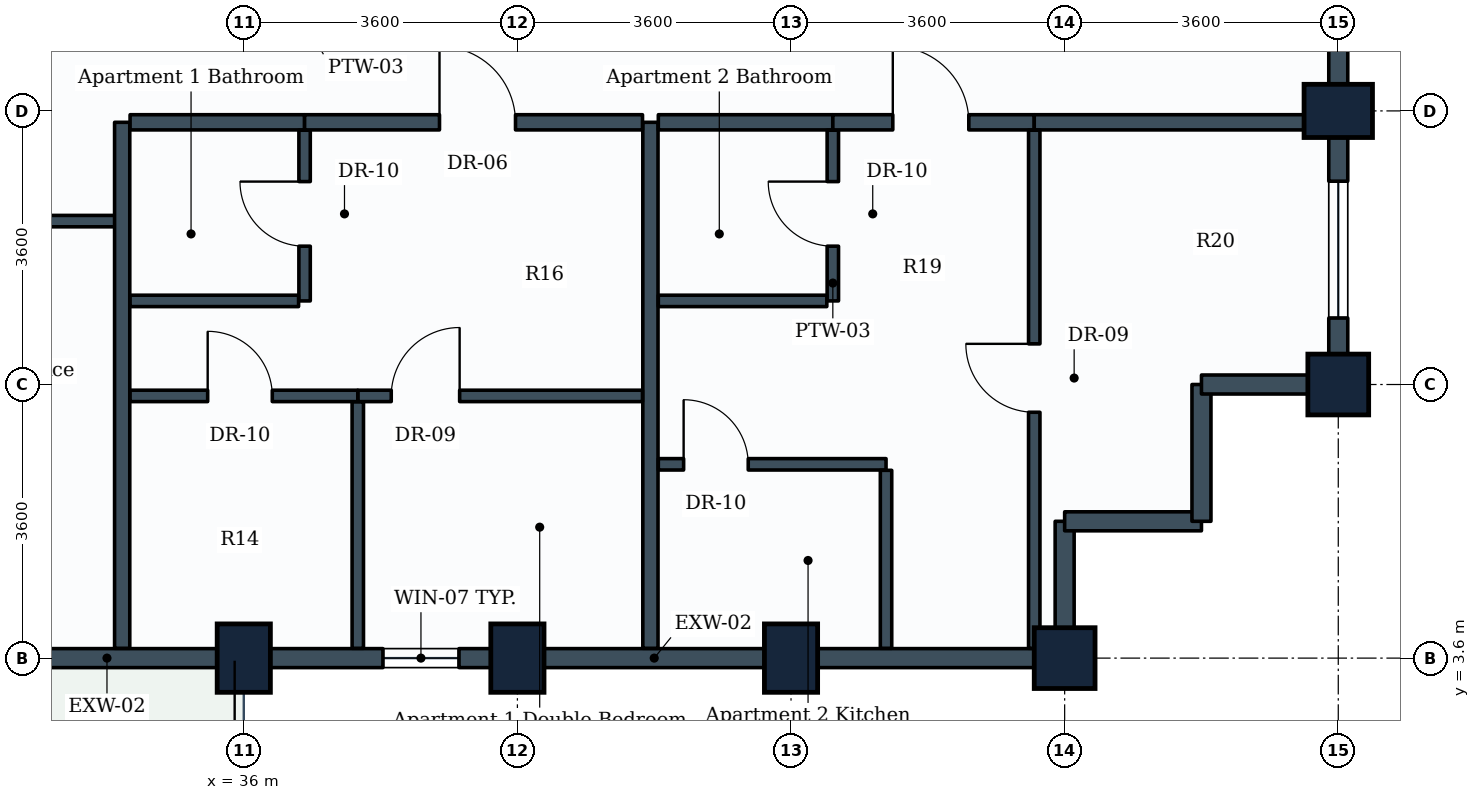
"""IFC4 building model, lengths in metres.
Left out: names, types, materials, properties, quantities, classifications, styles, units other than length and angle.
Written with IfcOpenShell. Run it as: python <this file> out.ifc"""

import sys

from ifc_helpers import new_model, si_unit, direction, frame, frame_2d, origin, origin_2d, place, context, subcontext, project, spatial, rectangle, extrude, element, fill, save


model = new_model("IFC4")
c1 = context("Model", 3, precision=1e-05, world=origin(), true_north=direction((0.0, 1.0)))
c2 = subcontext(c1, "Body", "Model", "MODEL_VIEW")
j1 = project(units=[si_unit("LENGTHUNIT", "METRE"), si_unit("PLANEANGLEUNIT", "RADIAN")], contexts=[c1])
p1 = place(None, origin())
s1 = spatial("IfcSite", under=j1, at=p1, CompositionType="ELEMENT")
p2 = place(p1, origin())
s2 = spatial("IfcBuilding", under=s1, at=p2, CompositionType="ELEMENT")
p3 = place(p2, frame((0.0, 0.0, 182.4)))
s3 = spatial("IfcBuildingStorey", under=s2, at=p3, CompositionType="ELEMENT", Elevation=182.4)
for number, where, z_axis, x_axis in (
    (1, (36.0, 3.6, 0.0), (0.0, 0.0, 1.0), (1.0, 0.0, 0.0)),
    (2, (39.6, 3.6, 0.0), (0.0, 0.0, 1.0), (1.0, 0.0, 0.0)),
    (3, (43.2, 3.6, 0.0), (0.0, 0.0, 1.0), (1.0, 0.0, 0.0)),
):
    element("IfcColumn", number, at=place(p3, frame(where, z_axis=z_axis, x_axis=x_axis)), inside=s3, PredefinedType="COLUMN", context=c2, shape_type="SweptSolid", body=[
        extrude(rectangle(XDim=0.7, YDim=0.9, at=origin_2d()), origin(), (0.0, 0.0, 1.0), 3.8),
    ])
for number, where, z_axis, x_axis in (
    (4, (46.8, 3.6, 0.0), (0.0, 0.0, 1.0), (1.0, 0.0, 0.0)),
    (5, (50.4, 7.2, 0.0), (0.0, 0.0, 1.0), (1.0, 0.0, 0.0)),
):
    element("IfcColumn", number, at=place(p3, frame(where, z_axis=z_axis, x_axis=x_axis)), inside=s3, PredefinedType="COLUMN", context=c2, shape_type="SweptSolid", body=[
        extrude(rectangle(XDim=0.8, YDim=0.8, at=origin_2d()), origin(), (0.0, 0.0, 1.0), 3.8),
    ])
p4 = place(p3, frame((50.4, 10.8, 0.0), z_axis=(0.0, 0.0, 1.0), x_axis=(0.0, 1.0, 0.0)))
e6 = element("IfcColumn", 6, at=p4, inside=s3, PredefinedType="COLUMN", context=c2, shape_type="SweptSolid", body=[
    extrude(rectangle(XDim=0.7, YDim=0.9, at=origin_2d()), origin(), (0.0, 0.0, 1.0), 3.8),
])
p5 = place(p3, frame((36.0, 3.6, 0.0), z_axis=(0.0, 0.0, 1.0), x_axis=(-1.0, 0.0, 0.0)))
e7 = element("IfcWall", 7, at=p5, inside=s3, PredefinedType="STANDARD", context=c2, shape_type="SweptSolid", body=[
    extrude(rectangle(XDim=3.6, YDim=0.25, at=frame_2d((1.8, 0.0))), origin(), (0.0, 0.0, 1.0), 2.93),
])
p6 = place(p3, frame((39.6, 3.6, 0.0), z_axis=(0.0, 0.0, 1.0), x_axis=(-1.0, 0.0, 0.0)))
e8 = element("IfcWall", 8, at=p6, inside=s3, PredefinedType="STANDARD", context=c2, shape_type="SweptSolid", body=[
    extrude(rectangle(XDim=3.6, YDim=0.25, at=frame_2d((1.8, 0.0))), origin(), (0.0, 0.0, 1.0), 2.93),
])
p7 = place(p6, frame((0.769, 0.0, 0.85)))
e9 = element("IfcOpeningElement", 9, at=p7, cuts=e8, PredefinedType="OPENING", context=c2, shape_type="SweptSolid", body=[
    extrude(rectangle(XDim=1.0, YDim=1.35, at=frame_2d((0.5, 0.675))), frame((0.0, 0.135, 0.0), z_axis=(0.0, -1.0, 0.0), x_axis=(1.0, 0.0, 0.0)), (0.0, 0.0, 1.0), 0.27),
])
p8 = place(p3, frame((43.2, 3.6, 0.0), z_axis=(0.0, 0.0, 1.0), x_axis=(-1.0, 0.0, 0.0)))
e10 = element("IfcWall", 10, at=p8, inside=s3, PredefinedType="STANDARD", context=c2, shape_type="SweptSolid", body=[
    extrude(rectangle(XDim=3.6, YDim=0.25, at=frame_2d((1.8, 0.0))), origin(), (0.0, 0.0, 1.0), 2.93),
])
p9 = place(p3, frame((46.8, 3.6, 0.0), z_axis=(0.0, 0.0, 1.0), x_axis=(-1.0, 0.0, 0.0)))
e11 = element("IfcWall", 11, at=p9, inside=s3, PredefinedType="STANDARD", context=c2, shape_type="SweptSolid", body=[
    extrude(rectangle(XDim=3.6, YDim=0.25, at=frame_2d((1.8, 0.0))), origin(), (0.0, 0.0, 1.0), 2.93),
])
p10 = place(p3, frame((46.8, 5.4, 0.0), z_axis=(0.0, 0.0, 1.0), x_axis=(0.0, -1.0, 0.0)))
e12 = element("IfcWall", 12, at=p10, inside=s3, PredefinedType="STANDARD", context=c2, shape_type="SweptSolid", body=[
    extrude(rectangle(XDim=1.8, YDim=0.25, at=frame_2d((0.9, 0.0))), origin(), (0.0, 0.0, 1.0), 2.93),
])
for number, where, z_axis, x_axis in (
    (13, (48.6, 5.4, 0.0), (0.0, 0.0, 1.0), (-1.0, 0.0, 0.0)),
    (14, (48.6, 7.2, 0.0), (0.0, 0.0, 1.0), (0.0, -1.0, 0.0)),
):
    element("IfcWall", number, at=place(p3, frame(where, z_axis=z_axis, x_axis=x_axis)), inside=s3, PredefinedType="STANDARD", context=c2, shape_type="SweptSolid", body=[
        extrude(rectangle(XDim=1.8, YDim=0.25, at=frame_2d((0.9, 0.0))), origin(), (0.0, 0.0, 1.0), 3.535),
    ])
p11 = place(p3, frame((50.4, 7.2, 0.0), z_axis=(0.0, 0.0, 1.0), x_axis=(-1.0, 0.0, 0.0)))
e15 = element("IfcWall", 15, at=p11, inside=s3, PredefinedType="STANDARD", context=c2, shape_type="SweptSolid", body=[
    extrude(rectangle(XDim=1.8, YDim=0.25, at=frame_2d((0.9, 0.0))), origin(), (0.0, 0.0, 1.0), 2.93),
])
p12 = place(p3, frame((50.4, 10.8, 0.0), z_axis=(0.0, 0.0, 1.0), x_axis=(0.0, -1.0, 0.0)))
e16 = element("IfcWall", 16, at=p12, inside=s3, PredefinedType="STANDARD", context=c2, shape_type="SweptSolid", body=[
    extrude(rectangle(XDim=3.6, YDim=0.25, at=frame_2d((1.8, 0.0))), origin(), (0.0, 0.0, 1.0), 2.93),
])
p13 = place(p12, frame((0.925, 0.0, 0.85)))
e17 = element("IfcOpeningElement", 17, at=p13, cuts=e16, PredefinedType="OPENING", context=c2, shape_type="SweptSolid", body=[
    extrude(rectangle(XDim=1.8, YDim=1.35, at=frame_2d((0.9, 0.675))), frame((0.0, 0.135, 0.0), z_axis=(0.0, -1.0, 0.0), x_axis=(1.0, 0.0, 0.0)), (0.0, 0.0, 1.0), 0.27),
])
p14 = place(p3, frame((50.4, 14.4, 0.0), z_axis=(0.0, 0.0, 1.0), x_axis=(0.0, -1.0, 0.0)))
e18 = element("IfcWall", 18, at=p14, inside=s3, PredefinedType="STANDARD", context=c2, shape_type="SweptSolid", body=[
    extrude(rectangle(XDim=3.6, YDim=0.25, at=frame_2d((1.8, 0.0))), origin(), (0.0, 0.0, 1.0), 2.93),
])
p15 = place(p3, frame((28.879, 9.35, 0.0), z_axis=(0.0, 0.0, 1.0), x_axis=(1.0, 0.0, 0.0)))
e19 = element("IfcWall", 19, at=p15, inside=s3, PredefinedType="PARTITIONING", context=c2, shape_type="SweptSolid", body=[
    extrude(rectangle(XDim=5.521, YDim=0.15, at=frame_2d((2.76, 0.0))), origin(), (0.0, 0.0, 1.0), 3.535),
])
p16 = place(p15, frame((0.36, 0.0, 0.0)))
e20 = element("IfcOpeningElement", 20, at=p16, cuts=e19, PredefinedType="OPENING", context=c2, shape_type="SweptSolid", body=[
    extrude(rectangle(XDim=1.0, YDim=2.1, at=frame_2d((0.5, 1.05))), frame((0.0, 0.085, 0.0), z_axis=(0.0, -1.0, 0.0), x_axis=(1.0, 0.0, 0.0)), (0.0, 0.0, 1.0), 0.17),
])
for number, where, z_axis, x_axis in (
    (21, (34.4, 3.729, 0.0), (0.0, 0.0, 1.0), (0.0, 1.0, 0.0)),
    (22, (41.35, 3.729, 0.0), (0.0, 0.0, 1.0), (0.0, 1.0, 0.0)),
):
    element("IfcWall", number, at=place(p3, frame(where, z_axis=z_axis, x_axis=x_axis)), inside=s3, PredefinedType="PARTITIONING", context=c2, shape_type="SweptSolid", body=[
        extrude(rectangle(XDim=6.921, YDim=0.2, at=frame_2d((3.46, 0.0))), origin(), (0.0, 0.0, 1.0), 2.93),
    ])
p17 = place(p3, frame((34.504, 10.65, 0.0), z_axis=(0.0, 0.0, 1.0), x_axis=(1.0, 0.0, 0.0)))
e23 = element("IfcWall", 23, at=p17, inside=s3, PredefinedType="PARTITIONING", context=c2, shape_type="SweptSolid", body=[
    extrude(rectangle(XDim=2.296, YDim=0.2, at=frame_2d((1.148, 0.0))), origin(), (0.0, 0.0, 1.0), 3.22),
])
p18 = place(p3, frame((36.8, 8.3, 0.0), z_axis=(0.0, 0.0, 1.0), x_axis=(0.0, 1.0, 0.0)))
e24 = element("IfcWall", 24, at=p18, inside=s3, PredefinedType="PARTITIONING", context=c2, shape_type="SweptSolid", body=[
    extrude(rectangle(XDim=2.246, YDim=0.15, at=frame_2d((1.123, 0.0))), origin(), (0.0, 0.0, 1.0), 3.535),
])
p19 = place(p18, frame((0.72, 0.0, 0.0)))
e25 = element("IfcOpeningElement", 25, at=p19, cuts=e24, PredefinedType="OPENING", context=c2, shape_type="SweptSolid", body=[
    extrude(rectangle(XDim=0.85, YDim=2.1, at=frame_2d((0.425, 1.05))), frame((0.0, 0.085, 0.0), z_axis=(0.0, -1.0, 0.0), x_axis=(1.0, 0.0, 0.0)), (0.0, 0.0, 1.0), 0.17),
])
p20 = place(p3, frame((34.504, 8.3, 0.0), z_axis=(0.0, 0.0, 1.0), x_axis=(1.0, 0.0, 0.0)))
e26 = element("IfcWall", 26, at=p20, inside=s3, PredefinedType="PARTITIONING", context=c2, shape_type="SweptSolid", body=[
    extrude(rectangle(XDim=2.217, YDim=0.15, at=frame_2d((1.108, 0.0))), origin(), (0.0, 0.0, 1.0), 3.22),
])
p21 = place(p3, frame((36.8, 10.65, 0.0), z_axis=(0.0, 0.0, 1.0), x_axis=(1.0, 0.0, 0.0)))
e27 = element("IfcWall", 27, at=p21, inside=s3, PredefinedType="PARTITIONING", context=c2, shape_type="SweptSolid", body=[
    extrude(rectangle(XDim=4.446, YDim=0.2, at=frame_2d((2.223, 0.0))), origin(), (0.0, 0.0, 1.0), 3.17),
])
p22 = place(p21, frame((1.775, 0.0, 0.0)))
e28 = element("IfcOpeningElement", 28, at=p22, cuts=e27, PredefinedType="OPENING", context=c2, shape_type="SweptSolid", body=[
    extrude(rectangle(XDim=1.0, YDim=2.1, at=frame_2d((0.5, 1.05))), frame((0.0, 0.11, 0.0), z_axis=(0.0, -1.0, 0.0), x_axis=(1.0, 0.0, 0.0)), (0.0, 0.0, 1.0), 0.22),
])
p23 = place(p3, frame((37.5, 7.05, 0.0), z_axis=(0.0, 0.0, 1.0), x_axis=(1.0, 0.0, 0.0)))
e29 = element("IfcWall", 29, at=p23, inside=s3, PredefinedType="PARTITIONING", context=c2, shape_type="SweptSolid", body=[
    extrude(rectangle(XDim=3.746, YDim=0.15, at=frame_2d((1.873, 0.0))), origin(), (0.0, 0.0, 1.0), 3.17),
])
p24 = place(p23, frame((0.44, 0.0, 0.0)))
e30 = element("IfcOpeningElement", 30, at=p24, cuts=e29, PredefinedType="OPENING", context=c2, shape_type="SweptSolid", body=[
    extrude(rectangle(XDim=0.9, YDim=2.1, at=frame_2d((0.45, 1.05))), frame((0.0, 0.085, 0.0), z_axis=(0.0, -1.0, 0.0), x_axis=(1.0, 0.0, 0.0)), (0.0, 0.0, 1.0), 0.17),
])
p25 = place(p3, frame((34.504, 7.05, 0.0), z_axis=(0.0, 0.0, 1.0), x_axis=(1.0, 0.0, 0.0)))
e31 = element("IfcWall", 31, at=p25, inside=s3, PredefinedType="PARTITIONING", context=c2, shape_type="SweptSolid", body=[
    extrude(rectangle(XDim=2.996, YDim=0.15, at=frame_2d((1.498, 0.0))), origin(), (0.0, 0.0, 1.0), 3.17),
])
p26 = place(p25, frame((1.021, 0.0, 0.0)))
e32 = element("IfcOpeningElement", 32, at=p26, cuts=e31, PredefinedType="OPENING", context=c2, shape_type="SweptSolid", body=[
    extrude(rectangle(XDim=0.85, YDim=2.1, at=frame_2d((0.425, 1.05))), frame((0.0, 0.085, 0.0), z_axis=(0.0, -1.0, 0.0), x_axis=(1.0, 0.0, 0.0)), (0.0, 0.0, 1.0), 0.17),
])
p27 = place(p3, frame((37.5, 3.729, 0.0), z_axis=(0.0, 0.0, 1.0), x_axis=(0.0, 1.0, 0.0)))
e33 = element("IfcWall", 33, at=p27, inside=s3, PredefinedType="PARTITIONING", context=c2, shape_type="SweptSolid", body=[
    extrude(rectangle(XDim=3.242, YDim=0.15, at=frame_2d((1.621, 0.0))), origin(), (0.0, 0.0, 1.0), 2.93),
])
p28 = place(p3, frame((41.454, 10.65, 0.0), z_axis=(0.0, 0.0, 1.0), x_axis=(1.0, 0.0, 0.0)))
e34 = element("IfcWall", 34, at=p28, inside=s3, PredefinedType="PARTITIONING", context=c2, shape_type="SweptSolid", body=[
    extrude(rectangle(XDim=2.296, YDim=0.2, at=frame_2d((1.148, 0.0))), origin(), (0.0, 0.0, 1.0), 3.17),
])
p29 = place(p3, frame((43.75, 8.3, 0.0), z_axis=(0.0, 0.0, 1.0), x_axis=(0.0, 1.0, 0.0)))
e35 = element("IfcWall", 35, at=p29, inside=s3, PredefinedType="PARTITIONING", context=c2, shape_type="SweptSolid", body=[
    extrude(rectangle(XDim=2.246, YDim=0.15, at=frame_2d((1.123, 0.0))), origin(), (0.0, 0.0, 1.0), 3.535),
])
p30 = place(p29, frame((0.72, 0.0, 0.0)))
e36 = element("IfcOpeningElement", 36, at=p30, cuts=e35, PredefinedType="OPENING", context=c2, shape_type="SweptSolid", body=[
    extrude(rectangle(XDim=0.85, YDim=2.1, at=frame_2d((0.425, 1.05))), frame((0.0, 0.085, 0.0), z_axis=(0.0, -1.0, 0.0), x_axis=(1.0, 0.0, 0.0)), (0.0, 0.0, 1.0), 0.17),
])
p31 = place(p3, frame((41.454, 8.3, 0.0), z_axis=(0.0, 0.0, 1.0), x_axis=(1.0, 0.0, 0.0)))
e37 = element("IfcWall", 37, at=p31, inside=s3, PredefinedType="PARTITIONING", context=c2, shape_type="SweptSolid", body=[
    extrude(rectangle(XDim=2.217, YDim=0.15, at=frame_2d((1.108, 0.0))), origin(), (0.0, 0.0, 1.0), 3.18),
])
p32 = place(p3, frame((43.75, 10.65, 0.0), z_axis=(0.0, 0.0, 1.0), x_axis=(1.0, 0.0, 0.0)))
e38 = element("IfcWall", 38, at=p32, inside=s3, PredefinedType="PARTITIONING", context=c2, shape_type="SweptSolid", body=[
    extrude(rectangle(XDim=2.65, YDim=0.2, at=frame_2d((1.325, 0.0))), origin(), (0.0, 0.0, 1.0), 3.535),
])
p33 = place(p32, frame((0.789, 0.0, 0.0)))
e39 = element("IfcOpeningElement", 39, at=p33, cuts=e38, PredefinedType="OPENING", context=c2, shape_type="SweptSolid", body=[
    extrude(rectangle(XDim=1.0, YDim=2.1, at=frame_2d((0.5, 1.05))), frame((0.0, 0.11, 0.0), z_axis=(0.0, -1.0, 0.0), x_axis=(1.0, 0.0, 0.0)), (0.0, 0.0, 1.0), 0.22),
])
p34 = place(p3, frame((46.4, 10.65, 0.0), z_axis=(0.0, 0.0, 1.0), x_axis=(1.0, 0.0, 0.0)))
e40 = element("IfcWall", 40, at=p34, inside=s3, PredefinedType="PARTITIONING", context=c2, shape_type="SweptSolid", body=[
    extrude(rectangle(XDim=3.871, YDim=0.2, at=frame_2d((1.936, 0.0))), origin(), (0.0, 0.0, 1.0), 2.93),
])
p35 = place(p3, frame((46.4, 3.729, 0.0), z_axis=(0.0, 0.0, 1.0), x_axis=(0.0, 1.0, 0.0)))
e41 = element("IfcWall", 41, at=p35, inside=s3, PredefinedType="PARTITIONING", context=c2, shape_type="SweptSolid", body=[
    extrude(rectangle(XDim=6.817, YDim=0.15, at=frame_2d((3.408, 0.0))), origin(), (0.0, 0.0, 1.0), 2.93),
])
p36 = place(p35, frame((3.106, 0.0, 0.0)))
e42 = element("IfcOpeningElement", 42, at=p36, cuts=e41, PredefinedType="OPENING", context=c2, shape_type="SweptSolid", body=[
    extrude(rectangle(XDim=0.9, YDim=2.1, at=frame_2d((0.45, 1.05))), frame((0.0, 0.085, 0.0), z_axis=(0.0, -1.0, 0.0), x_axis=(1.0, 0.0, 0.0)), (0.0, 0.0, 1.0), 0.17),
])
p37 = place(p3, frame((41.454, 6.15, 0.0), z_axis=(0.0, 0.0, 1.0), x_axis=(1.0, 0.0, 0.0)))
e43 = element("IfcWall", 43, at=p37, inside=s3, PredefinedType="PARTITIONING", context=c2, shape_type="SweptSolid", body=[
    extrude(rectangle(XDim=2.996, YDim=0.15, at=frame_2d((1.498, 0.0))), origin(), (0.0, 0.0, 1.0), 3.18),
])
p38 = place(p37, frame((0.333, 0.0, 0.0)))
e44 = element("IfcOpeningElement", 44, at=p38, cuts=e43, PredefinedType="OPENING", context=c2, shape_type="SweptSolid", body=[
    extrude(rectangle(XDim=0.85, YDim=2.1, at=frame_2d((0.425, 1.05))), frame((0.0, 0.085, 0.0), z_axis=(0.0, -1.0, 0.0), x_axis=(1.0, 0.0, 0.0)), (0.0, 0.0, 1.0), 0.17),
])
p39 = place(p3, frame((44.45, 3.729, 0.0), z_axis=(0.0, 0.0, 1.0), x_axis=(0.0, 1.0, 0.0)))
e45 = element("IfcWall", 45, at=p39, inside=s3, PredefinedType="PARTITIONING", context=c2, shape_type="SweptSolid", body=[
    extrude(rectangle(XDim=2.342, YDim=0.15, at=frame_2d((1.171, 0.0))), origin(), (0.0, 0.0, 1.0), 2.93),
])
p40 = place(p13, origin())
e46 = element("IfcWindow", 46, at=p40, inside=s3, PartitioningType="SINGLE_PANEL", PredefinedType="WINDOW", context=c2, shape_type="SweptSolid", body=[
    extrude(rectangle(XDim=1.8, YDim=1.35, at=frame_2d((0.9, 0.675))), frame((0.0, 0.03, 0.0), z_axis=(0.0, -1.0, 0.0), x_axis=(1.0, 0.0, 0.0)), (0.0, 0.0, 1.0), 0.06),
])
fill(e17, e46)
p41 = place(p19, origin())
e47 = element("IfcDoor", 47, at=p41, inside=s3, OperationType="SINGLE_SWING_RIGHT", PredefinedType="DOOR", context=c2, shape_type="SweptSolid", body=[
    extrude(rectangle(XDim=0.85, YDim=2.1, at=frame_2d((0.425, 1.05))), frame((0.0, 0.025, 0.0), z_axis=(0.0, -1.0, 0.0), x_axis=(1.0, 0.0, 0.0)), (0.0, 0.0, 1.0), 0.05),
])
fill(e25, e47)
p42 = place(p22, origin())
e48 = element("IfcDoor", 48, at=p42, inside=s3, OperationType="SINGLE_SWING_LEFT", PredefinedType="DOOR", context=c2, shape_type="SweptSolid", body=[
    extrude(rectangle(XDim=1.0, YDim=2.1, at=frame_2d((0.5, 1.05))), frame((0.0, 0.025, 0.0), z_axis=(0.0, -1.0, 0.0), x_axis=(1.0, 0.0, 0.0)), (0.0, 0.0, 1.0), 0.05),
])
fill(e28, e48)
p43 = place(p24, origin())
e49 = element("IfcDoor", 49, at=p43, inside=s3, OperationType="SINGLE_SWING_RIGHT", PredefinedType="DOOR", context=c2, shape_type="SweptSolid", body=[
    extrude(rectangle(XDim=0.9, YDim=2.1, at=frame_2d((0.45, 1.05))), frame((0.0, 0.025, 0.0), z_axis=(0.0, -1.0, 0.0), x_axis=(1.0, 0.0, 0.0)), (0.0, 0.0, 1.0), 0.05),
])
fill(e30, e49)
p44 = place(p26, origin())
e50 = element("IfcDoor", 50, at=p44, inside=s3, OperationType="SINGLE_SWING_LEFT", PredefinedType="DOOR", context=c2, shape_type="SweptSolid", body=[
    extrude(rectangle(XDim=0.85, YDim=2.1, at=frame_2d((0.425, 1.05))), frame((0.0, 0.025, 0.0), z_axis=(0.0, -1.0, 0.0), x_axis=(1.0, 0.0, 0.0)), (0.0, 0.0, 1.0), 0.05),
])
fill(e32, e50)
p45 = place(p30, origin())
e51 = element("IfcDoor", 51, at=p45, inside=s3, OperationType="SINGLE_SWING_RIGHT", PredefinedType="DOOR", context=c2, shape_type="SweptSolid", body=[
    extrude(rectangle(XDim=0.85, YDim=2.1, at=frame_2d((0.425, 1.05))), frame((0.0, 0.025, 0.0), z_axis=(0.0, -1.0, 0.0), x_axis=(1.0, 0.0, 0.0)), (0.0, 0.0, 1.0), 0.05),
])
fill(e36, e51)
p46 = place(p33, origin())
e52 = element("IfcDoor", 52, at=p46, inside=s3, OperationType="SINGLE_SWING_LEFT", PredefinedType="DOOR", context=c2, shape_type="SweptSolid", body=[
    extrude(rectangle(XDim=1.0, YDim=2.1, at=frame_2d((0.5, 1.05))), frame((0.0, 0.025, 0.0), z_axis=(0.0, -1.0, 0.0), x_axis=(1.0, 0.0, 0.0)), (0.0, 0.0, 1.0), 0.05),
])
fill(e39, e52)
p47 = place(p36, origin())
e53 = element("IfcDoor", 53, at=p47, inside=s3, OperationType="SINGLE_SWING_RIGHT", PredefinedType="DOOR", context=c2, shape_type="SweptSolid", body=[
    extrude(rectangle(XDim=0.9, YDim=2.1, at=frame_2d((0.45, 1.05))), frame((0.0, 0.025, 0.0), z_axis=(0.0, -1.0, 0.0), x_axis=(1.0, 0.0, 0.0)), (0.0, 0.0, 1.0), 0.05),
])
fill(e42, e53)
p48 = place(p38, origin())
e54 = element("IfcDoor", 54, at=p48, inside=s3, OperationType="SINGLE_SWING_LEFT", PredefinedType="DOOR", context=c2, shape_type="SweptSolid", body=[
    extrude(rectangle(XDim=0.85, YDim=2.1, at=frame_2d((0.425, 1.05))), frame((0.0, 0.025, 0.0), z_axis=(0.0, -1.0, 0.0), x_axis=(1.0, 0.0, 0.0)), (0.0, 0.0, 1.0), 0.05),
])
fill(e44, e54)
p49 = place(p7, origin())
e55 = element("IfcWindow", 55, at=p49, inside=s3, PartitioningType="SINGLE_PANEL", PredefinedType="WINDOW", context=c2, shape_type="SweptSolid", body=[
    extrude(rectangle(XDim=1.0, YDim=1.35, at=frame_2d((0.5, 0.675))), frame((0.0, 0.03, 0.0), z_axis=(0.0, -1.0, 0.0), x_axis=(1.0, 0.0, 0.0)), (0.0, 0.0, 1.0), 0.06),
])
fill(e9, e55)
save(model, sys.argv[1])
